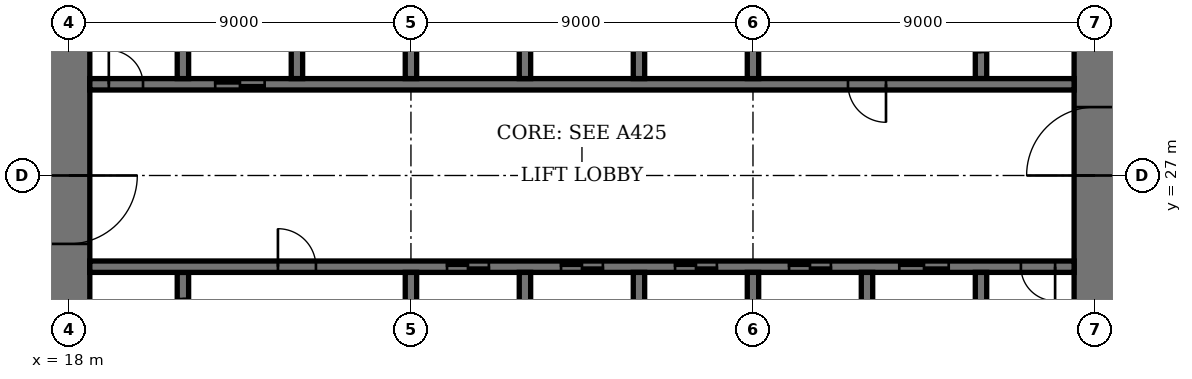
"""IFC4 building model, lengths in metres.
Left out: names, types, materials, properties, quantities, classifications, styles, units other than length and angle.
Written with IfcOpenShell. Run it as: python <this file> out.ifc"""

import sys

from ifc_helpers import new_model, si_unit, direction, frame, frame_2d, origin, place, context, subcontext, project, spatial, rectangle, extrude, element, fill, save


model = new_model("IFC4")
c1 = context("Model", 3, precision=1e-05, world=origin(), true_north=direction((0.0, 1.0)))
c2 = subcontext(c1, "Body", "Model", "MODEL_VIEW")
j1 = project(units=[si_unit("LENGTHUNIT", "METRE"), si_unit("PLANEANGLEUNIT", "RADIAN")], contexts=[c1])
p1 = place(None, origin())
s1 = spatial("IfcSite", under=j1, at=p1, CompositionType="ELEMENT")
p2 = place(p1, origin())
s2 = spatial("IfcBuilding", under=s1, at=p2, CompositionType="ELEMENT")
p3 = place(p2, frame((0.0, 0.0, 27.8)))
s3 = spatial("IfcBuildingStorey", under=s2, at=p3, CompositionType="ELEMENT", Elevation=27.8)
p4 = place(p3, frame((18.0, 35.45, 0.0), z_axis=(0.0, 0.0, 1.0), x_axis=(0.0, -1.0, 0.0)))
e1 = element("IfcWall", 1, at=p4, inside=s3, PredefinedType="SHEAR", context=c2, shape_type="SweptSolid", body=[
    extrude(rectangle(XDim=16.9, YDim=1.1, at=frame_2d((8.45, 0.0))), origin(), (0.0, 0.0, 1.0), 4.0),
])
p5 = place(p4, frame((8.45, 0.0, 0.0)))
e2 = element("IfcOpeningElement", 2, at=p5, cuts=e1, PredefinedType="OPENING", context=c2, shape_type="SweptSolid", body=[
    extrude(rectangle(XDim=1.8, YDim=2.4, at=frame_2d((0.9, 1.2))), frame((0.0, 0.56, 0.0), z_axis=(0.0, -1.0, 0.0), x_axis=(1.0, 0.0, 0.0)), (0.0, 0.0, 1.0), 1.12),
])
p6 = place(p3, frame((45.0, 18.55, 0.0), z_axis=(0.0, 0.0, 1.0), x_axis=(0.0, 1.0, 0.0)))
e3 = element("IfcWall", 3, at=p6, inside=s3, PredefinedType="SHEAR", context=c2, shape_type="SweptSolid", body=[
    extrude(rectangle(XDim=16.9, YDim=1.1, at=frame_2d((8.45, 0.0))), origin(), (0.0, 0.0, 1.0), 4.0),
])
p7 = place(p6, frame((8.45, 0.0, 0.0)))
e4 = element("IfcOpeningElement", 4, at=p7, cuts=e3, PredefinedType="OPENING", context=c2, shape_type="SweptSolid", body=[
    extrude(rectangle(XDim=1.8, YDim=2.4, at=frame_2d((0.9, 1.2))), frame((0.0, 0.56, 0.0), z_axis=(0.0, -1.0, 0.0), x_axis=(1.0, 0.0, 0.0)), (0.0, 0.0, 1.0), 1.12),
])
p8 = place(p3, frame((21.0, 21.95, 0.0), z_axis=(0.0, 0.0, 1.0), x_axis=(0.0, 1.0, 0.0)))
e5 = element("IfcWall", 5, at=p8, inside=s3, PredefinedType="SHEAR", context=c2, shape_type="SweptSolid", body=[
    extrude(rectangle(XDim=2.5, YDim=0.3, at=frame_2d((1.25, 0.0))), origin(), (0.0, 0.0, 1.0), 4.0),
])
p9 = place(p8, frame((0.7, 0.0, 0.0)))
e6 = element("IfcOpeningElement", 6, at=p9, cuts=e5, PredefinedType="OPENING", context=c2, shape_type="SweptSolid", body=[
    extrude(rectangle(XDim=1.1, YDim=2.4, at=frame_2d((0.55, 1.2))), frame((0.0, 0.16, 0.0), z_axis=(0.0, -1.0, 0.0), x_axis=(1.0, 0.0, 0.0)), (0.0, 0.0, 1.0), 0.32),
])
p10 = place(p3, frame((42.0, 29.55, 0.0), z_axis=(0.0, 0.0, 1.0), x_axis=(0.0, 1.0, 0.0)))
e7 = element("IfcWall", 7, at=p10, inside=s3, PredefinedType="SHEAR", context=c2, shape_type="SweptSolid", body=[
    extrude(rectangle(XDim=2.5, YDim=0.3, at=frame_2d((1.25, 0.0))), origin(), (0.0, 0.0, 1.0), 4.0),
])
p11 = place(p10, frame((0.7, 0.0, 0.0)))
e8 = element("IfcOpeningElement", 8, at=p11, cuts=e7, PredefinedType="OPENING", context=c2, shape_type="SweptSolid", body=[
    extrude(rectangle(XDim=1.1, YDim=2.4, at=frame_2d((0.55, 1.2))), frame((0.0, 0.16, 0.0), z_axis=(0.0, -1.0, 0.0), x_axis=(1.0, 0.0, 0.0)), (0.0, 0.0, 1.0), 0.32),
])
p12 = place(p3, frame((18.55, 24.6, 0.0), z_axis=(0.0, 0.0, 1.0), x_axis=(1.0, 0.0, 0.0)))
e9 = element("IfcWall", 9, at=p12, inside=s3, PredefinedType="SHEAR", context=c2, shape_type="SweptSolid", body=[
    extrude(rectangle(XDim=25.9, YDim=0.3, at=frame_2d((12.95, 0.0))), origin(), (0.0, 0.0, 1.0), 4.0),
])
p13 = place(p12, frame((4.95, 0.0, 0.0)))
e10 = element("IfcOpeningElement", 10, at=p13, cuts=e9, PredefinedType="OPENING", context=c2, shape_type="SweptSolid", body=[
    extrude(rectangle(XDim=1.0, YDim=2.4, at=frame_2d((0.5, 1.2))), frame((0.0, 0.16, 0.0), z_axis=(0.0, -1.0, 0.0), x_axis=(1.0, 0.0, 0.0)), (0.0, 0.0, 1.0), 0.32),
])
p14 = place(p12, frame((24.5, 0.0, 0.0)))
e11 = element("IfcOpeningElement", 11, at=p14, cuts=e9, PredefinedType="OPENING", context=c2, shape_type="SweptSolid", body=[
    extrude(rectangle(XDim=0.9, YDim=2.1, at=frame_2d((0.45, 1.05))), frame((0.0, 0.16, 0.0), z_axis=(0.0, -1.0, 0.0), x_axis=(1.0, 0.0, 0.0)), (0.0, 0.0, 1.0), 0.32),
])
p15 = place(p12, frame((9.4, 0.0, 0.0)))
e12 = element("IfcOpeningElement", 12, at=p15, cuts=e9, PredefinedType="OPENING", context=c2, shape_type="SweptSolid", body=[
    extrude(rectangle(XDim=1.1, YDim=2.4, at=frame_2d((0.55, 1.2))), frame((0.0, 0.16, 0.0), z_axis=(0.0, -1.0, 0.0), x_axis=(1.0, 0.0, 0.0)), (0.0, 0.0, 1.0), 0.32),
])
p16 = place(p12, frame((12.4, 0.0, 0.0)))
e13 = element("IfcOpeningElement", 13, at=p16, cuts=e9, PredefinedType="OPENING", context=c2, shape_type="SweptSolid", body=[
    extrude(rectangle(XDim=1.1, YDim=2.4, at=frame_2d((0.55, 1.2))), frame((0.0, 0.16, 0.0), z_axis=(0.0, -1.0, 0.0), x_axis=(1.0, 0.0, 0.0)), (0.0, 0.0, 1.0), 0.32),
])
p17 = place(p12, frame((15.4, 0.0, 0.0)))
e14 = element("IfcOpeningElement", 14, at=p17, cuts=e9, PredefinedType="OPENING", context=c2, shape_type="SweptSolid", body=[
    extrude(rectangle(XDim=1.1, YDim=2.4, at=frame_2d((0.55, 1.2))), frame((0.0, 0.16, 0.0), z_axis=(0.0, -1.0, 0.0), x_axis=(1.0, 0.0, 0.0)), (0.0, 0.0, 1.0), 0.32),
])
p18 = place(p12, frame((18.4, 0.0, 0.0)))
e15 = element("IfcOpeningElement", 15, at=p18, cuts=e9, PredefinedType="OPENING", context=c2, shape_type="SweptSolid", body=[
    extrude(rectangle(XDim=1.1, YDim=2.4, at=frame_2d((0.55, 1.2))), frame((0.0, 0.16, 0.0), z_axis=(0.0, -1.0, 0.0), x_axis=(1.0, 0.0, 0.0)), (0.0, 0.0, 1.0), 0.32),
])
p19 = place(p12, frame((21.3, 0.0, 0.0)))
e16 = element("IfcOpeningElement", 16, at=p19, cuts=e9, PredefinedType="OPENING", context=c2, shape_type="SweptSolid", body=[
    extrude(rectangle(XDim=1.3, YDim=2.4, at=frame_2d((0.65, 1.2))), frame((0.0, 0.16, 0.0), z_axis=(0.0, -1.0, 0.0), x_axis=(1.0, 0.0, 0.0)), (0.0, 0.0, 1.0), 0.32),
])
p20 = place(p3, frame((18.55, 29.4, 0.0), z_axis=(0.0, 0.0, 1.0), x_axis=(1.0, 0.0, 0.0)))
e17 = element("IfcWall", 17, at=p20, inside=s3, PredefinedType="SHEAR", context=c2, shape_type="SweptSolid", body=[
    extrude(rectangle(XDim=25.9, YDim=0.3, at=frame_2d((12.95, 0.0))), origin(), (0.0, 0.0, 1.0), 4.0),
])
p21 = place(p20, frame((19.95, 0.0, 0.0)))
e18 = element("IfcOpeningElement", 18, at=p21, cuts=e17, PredefinedType="OPENING", context=c2, shape_type="SweptSolid", body=[
    extrude(rectangle(XDim=1.0, YDim=2.4, at=frame_2d((0.5, 1.2))), frame((0.0, 0.16, 0.0), z_axis=(0.0, -1.0, 0.0), x_axis=(1.0, 0.0, 0.0)), (0.0, 0.0, 1.0), 0.32),
])
p22 = place(p20, frame((0.5, 0.0, 0.0)))
e19 = element("IfcOpeningElement", 19, at=p22, cuts=e17, PredefinedType="OPENING", context=c2, shape_type="SweptSolid", body=[
    extrude(rectangle(XDim=0.9, YDim=2.1, at=frame_2d((0.45, 1.05))), frame((0.0, 0.16, 0.0), z_axis=(0.0, -1.0, 0.0), x_axis=(1.0, 0.0, 0.0)), (0.0, 0.0, 1.0), 0.32),
])
p23 = place(p20, frame((3.3, 0.0, 0.0)))
e20 = element("IfcOpeningElement", 20, at=p23, cuts=e17, PredefinedType="OPENING", context=c2, shape_type="SweptSolid", body=[
    extrude(rectangle(XDim=1.3, YDim=2.4, at=frame_2d((0.65, 1.2))), frame((0.0, 0.16, 0.0), z_axis=(0.0, -1.0, 0.0), x_axis=(1.0, 0.0, 0.0)), (0.0, 0.0, 1.0), 0.32),
])
for number, where, z_axis, x_axis in (
    (21, (30.0, 21.75, 0.0), (0.0, 0.0, 1.0), (0.0, 1.0, 0.0)),
    (22, (33.0, 29.55, 0.0), (0.0, 0.0, 1.0), (0.0, 1.0, 0.0)),
    (23, (33.0, 21.75, 0.0), (0.0, 0.0, 1.0), (0.0, 1.0, 0.0)),
    (24, (30.0, 29.55, 0.0), (0.0, 0.0, 1.0), (0.0, 1.0, 0.0)),
    (25, (36.0, 21.75, 0.0), (0.0, 0.0, 1.0), (0.0, 1.0, 0.0)),
    (26, (27.0, 29.55, 0.0), (0.0, 0.0, 1.0), (0.0, 1.0, 0.0)),
):
    element("IfcWall", number, at=place(p3, frame(where, z_axis=z_axis, x_axis=x_axis)), inside=s3, PredefinedType="SHEAR", context=c2, shape_type="SweptSolid", body=[
        extrude(rectangle(XDim=2.7, YDim=0.3, at=frame_2d((1.35, 0.0))), origin(), (0.0, 0.0, 1.0), 4.0),
    ])
for number, where, z_axis, x_axis in (
    (27, (39.0, 18.55, 0.0), (0.0, 0.0, 1.0), (0.0, 1.0, 0.0)),
    (28, (24.0, 29.55, 0.0), (0.0, 0.0, 1.0), (0.0, 1.0, 0.0)),
):
    element("IfcWall", number, at=place(p3, frame(where, z_axis=z_axis, x_axis=x_axis)), inside=s3, PredefinedType="SHEAR", context=c2, shape_type="SweptSolid", body=[
        extrude(rectangle(XDim=5.9, YDim=0.3, at=frame_2d((2.95, 0.0))), origin(), (0.0, 0.0, 1.0), 4.0),
    ])
for number, where, z_axis, x_axis in (
    (29, (42.0, 21.75, 0.0), (0.0, 0.0, 1.0), (0.0, 1.0, 0.0)),
    (30, (21.0, 29.55, 0.0), (0.0, 0.0, 1.0), (0.0, 1.0, 0.0)),
):
    element("IfcWall", number, at=place(p3, frame(where, z_axis=z_axis, x_axis=x_axis)), inside=s3, PredefinedType="SHEAR", context=c2, shape_type="SweptSolid", body=[
        extrude(rectangle(XDim=2.7, YDim=0.3, at=frame_2d((1.35, 0.0))), origin(), (0.0, 0.0, 1.0), 4.0),
    ])
for number, where, z_axis, x_axis in (
    (31, (27.0, 21.6, 0.0), (0.0, 0.0, 1.0), (0.0, 1.0, 0.0)),
    (32, (36.0, 29.55, 0.0), (0.0, 0.0, 1.0), (0.0, 1.0, 0.0)),
):
    element("IfcWall", number, at=place(p3, frame(where, z_axis=z_axis, x_axis=x_axis)), inside=s3, PredefinedType="SHEAR", context=c2, shape_type="SweptSolid", body=[
        extrude(rectangle(XDim=2.85, YDim=0.3, at=frame_2d((1.425, 0.0))), origin(), (0.0, 0.0, 1.0), 4.0),
    ])
p24 = place(p5, origin())
e33 = element("IfcDoor", 33, at=p24, inside=s3, OperationType="DOUBLE_DOOR_DOUBLE_SWING", PredefinedType="DOOR", context=c2, shape_type="SweptSolid", body=[
    extrude(rectangle(XDim=1.8, YDim=2.4, at=frame_2d((0.9, 1.2))), frame((0.0, 0.03, 0.0), z_axis=(0.0, -1.0, 0.0), x_axis=(1.0, 0.0, 0.0)), (0.0, 0.0, 1.0), 0.06),
    extrude(rectangle(XDim=0.04, YDim=2.4, at=frame_2d((0.02, 1.2))), frame((0.0, 0.55, 0.0), z_axis=(0.0, -1.0, 0.0), x_axis=(1.0, 0.0, 0.0)), (0.0, 0.0, 1.0), 1.1),
    extrude(rectangle(XDim=0.04, YDim=2.4, at=frame_2d((1.78, 1.2))), frame((0.0, 0.55, 0.0), z_axis=(0.0, -1.0, 0.0), x_axis=(1.0, 0.0, 0.0)), (0.0, 0.0, 1.0), 1.1),
    extrude(rectangle(XDim=1.8, YDim=0.04, at=frame_2d((0.9, 2.38))), frame((0.0, 0.55, 0.0), z_axis=(0.0, -1.0, 0.0), x_axis=(1.0, 0.0, 0.0)), (0.0, 0.0, 1.0), 1.1),
])
fill(e2, e33)
p25 = place(p7, origin())
e34 = element("IfcDoor", 34, at=p25, inside=s3, OperationType="DOUBLE_DOOR_DOUBLE_SWING", PredefinedType="DOOR", context=c2, shape_type="SweptSolid", body=[
    extrude(rectangle(XDim=1.8, YDim=2.4, at=frame_2d((0.9, 1.2))), frame((0.0, 0.03, 0.0), z_axis=(0.0, -1.0, 0.0), x_axis=(1.0, 0.0, 0.0)), (0.0, 0.0, 1.0), 0.06),
    extrude(rectangle(XDim=0.04, YDim=2.4, at=frame_2d((0.02, 1.2))), frame((0.0, 0.55, 0.0), z_axis=(0.0, -1.0, 0.0), x_axis=(1.0, 0.0, 0.0)), (0.0, 0.0, 1.0), 1.1),
    extrude(rectangle(XDim=0.04, YDim=2.4, at=frame_2d((1.78, 1.2))), frame((0.0, 0.55, 0.0), z_axis=(0.0, -1.0, 0.0), x_axis=(1.0, 0.0, 0.0)), (0.0, 0.0, 1.0), 1.1),
    extrude(rectangle(XDim=1.8, YDim=0.04, at=frame_2d((0.9, 2.38))), frame((0.0, 0.55, 0.0), z_axis=(0.0, -1.0, 0.0), x_axis=(1.0, 0.0, 0.0)), (0.0, 0.0, 1.0), 1.1),
])
fill(e4, e34)
p26 = place(p13, origin())
e35 = element("IfcDoor", 35, at=p26, inside=s3, OperationType="SINGLE_SWING_RIGHT", PredefinedType="DOOR", context=c2, shape_type="SweptSolid", body=[
    extrude(rectangle(XDim=1.0, YDim=2.4, at=frame_2d((0.5, 1.2))), frame((0.0, 0.03, 0.0), z_axis=(0.0, -1.0, 0.0), x_axis=(1.0, 0.0, 0.0)), (0.0, 0.0, 1.0), 0.06),
])
fill(e10, e35)
p27 = place(p21, origin())
e36 = element("IfcDoor", 36, at=p27, inside=s3, OperationType="SINGLE_SWING_RIGHT", PredefinedType="DOOR", context=c2, shape_type="SweptSolid", body=[
    extrude(rectangle(XDim=1.0, YDim=2.4, at=frame_2d((0.5, 1.2))), frame((0.0, 0.03, 0.0), z_axis=(0.0, -1.0, 0.0), x_axis=(1.0, 0.0, 0.0)), (0.0, 0.0, 1.0), 0.06),
])
fill(e18, e36)
p28 = place(p14, origin())
e37 = element("IfcDoor", 37, at=p28, inside=s3, OperationType="SINGLE_SWING_RIGHT", PredefinedType="DOOR", context=c2, shape_type="SweptSolid", body=[
    extrude(rectangle(XDim=0.9, YDim=2.1, at=frame_2d((0.45, 1.05))), frame((0.0, 0.03, 0.0), z_axis=(0.0, -1.0, 0.0), x_axis=(1.0, 0.0, 0.0)), (0.0, 0.0, 1.0), 0.06),
])
fill(e11, e37)
p29 = place(p22, origin())
e38 = element("IfcDoor", 38, at=p29, inside=s3, OperationType="SINGLE_SWING_RIGHT", PredefinedType="DOOR", context=c2, shape_type="SweptSolid", body=[
    extrude(rectangle(XDim=0.9, YDim=2.1, at=frame_2d((0.45, 1.05))), frame((0.0, 0.03, 0.0), z_axis=(0.0, -1.0, 0.0), x_axis=(1.0, 0.0, 0.0)), (0.0, 0.0, 1.0), 0.06),
])
fill(e19, e38)
p30 = place(p15, origin())
e39 = element("IfcDoor", 39, at=p30, inside=s3, OperationType="DOUBLE_DOOR_SLIDING", PredefinedType="DOOR", context=c2, shape_type="SweptSolid", body=[
    extrude(rectangle(XDim=1.1, YDim=2.4, at=frame_2d((0.55, 1.2))), frame((0.0, 0.02, 0.0), z_axis=(0.0, -1.0, 0.0), x_axis=(1.0, 0.0, 0.0)), (0.0, 0.0, 1.0), 0.04),
])
fill(e12, e39)
p31 = place(p16, origin())
e40 = element("IfcDoor", 40, at=p31, inside=s3, OperationType="DOUBLE_DOOR_SLIDING", PredefinedType="DOOR", context=c2, shape_type="SweptSolid", body=[
    extrude(rectangle(XDim=1.1, YDim=2.4, at=frame_2d((0.55, 1.2))), frame((0.0, 0.02, 0.0), z_axis=(0.0, -1.0, 0.0), x_axis=(1.0, 0.0, 0.0)), (0.0, 0.0, 1.0), 0.04),
])
fill(e13, e40)
p32 = place(p17, origin())
e41 = element("IfcDoor", 41, at=p32, inside=s3, OperationType="DOUBLE_DOOR_SLIDING", PredefinedType="DOOR", context=c2, shape_type="SweptSolid", body=[
    extrude(rectangle(XDim=1.1, YDim=2.4, at=frame_2d((0.55, 1.2))), frame((0.0, 0.02, 0.0), z_axis=(0.0, -1.0, 0.0), x_axis=(1.0, 0.0, 0.0)), (0.0, 0.0, 1.0), 0.04),
])
fill(e14, e41)
p33 = place(p18, origin())
e42 = element("IfcDoor", 42, at=p33, inside=s3, OperationType="DOUBLE_DOOR_SLIDING", PredefinedType="DOOR", context=c2, shape_type="SweptSolid", body=[
    extrude(rectangle(XDim=1.1, YDim=2.4, at=frame_2d((0.55, 1.2))), frame((0.0, 0.02, 0.0), z_axis=(0.0, -1.0, 0.0), x_axis=(1.0, 0.0, 0.0)), (0.0, 0.0, 1.0), 0.04),
])
fill(e15, e42)
p34 = place(p19, origin())
e43 = element("IfcDoor", 43, at=p34, inside=s3, OperationType="DOUBLE_DOOR_SLIDING", PredefinedType="DOOR", context=c2, shape_type="SweptSolid", body=[
    extrude(rectangle(XDim=1.3, YDim=2.4, at=frame_2d((0.65, 1.2))), frame((0.0, 0.02, 0.0), z_axis=(0.0, -1.0, 0.0), x_axis=(1.0, 0.0, 0.0)), (0.0, 0.0, 1.0), 0.04),
])
fill(e16, e43)
p35 = place(p23, origin())
e44 = element("IfcDoor", 44, at=p35, inside=s3, OperationType="DOUBLE_DOOR_SLIDING", PredefinedType="DOOR", context=c2, shape_type="SweptSolid", body=[
    extrude(rectangle(XDim=1.3, YDim=2.4, at=frame_2d((0.65, 1.2))), frame((0.0, 0.02, 0.0), z_axis=(0.0, -1.0, 0.0), x_axis=(1.0, 0.0, 0.0)), (0.0, 0.0, 1.0), 0.04),
])
fill(e20, e44)
save(model, sys.argv[1])
